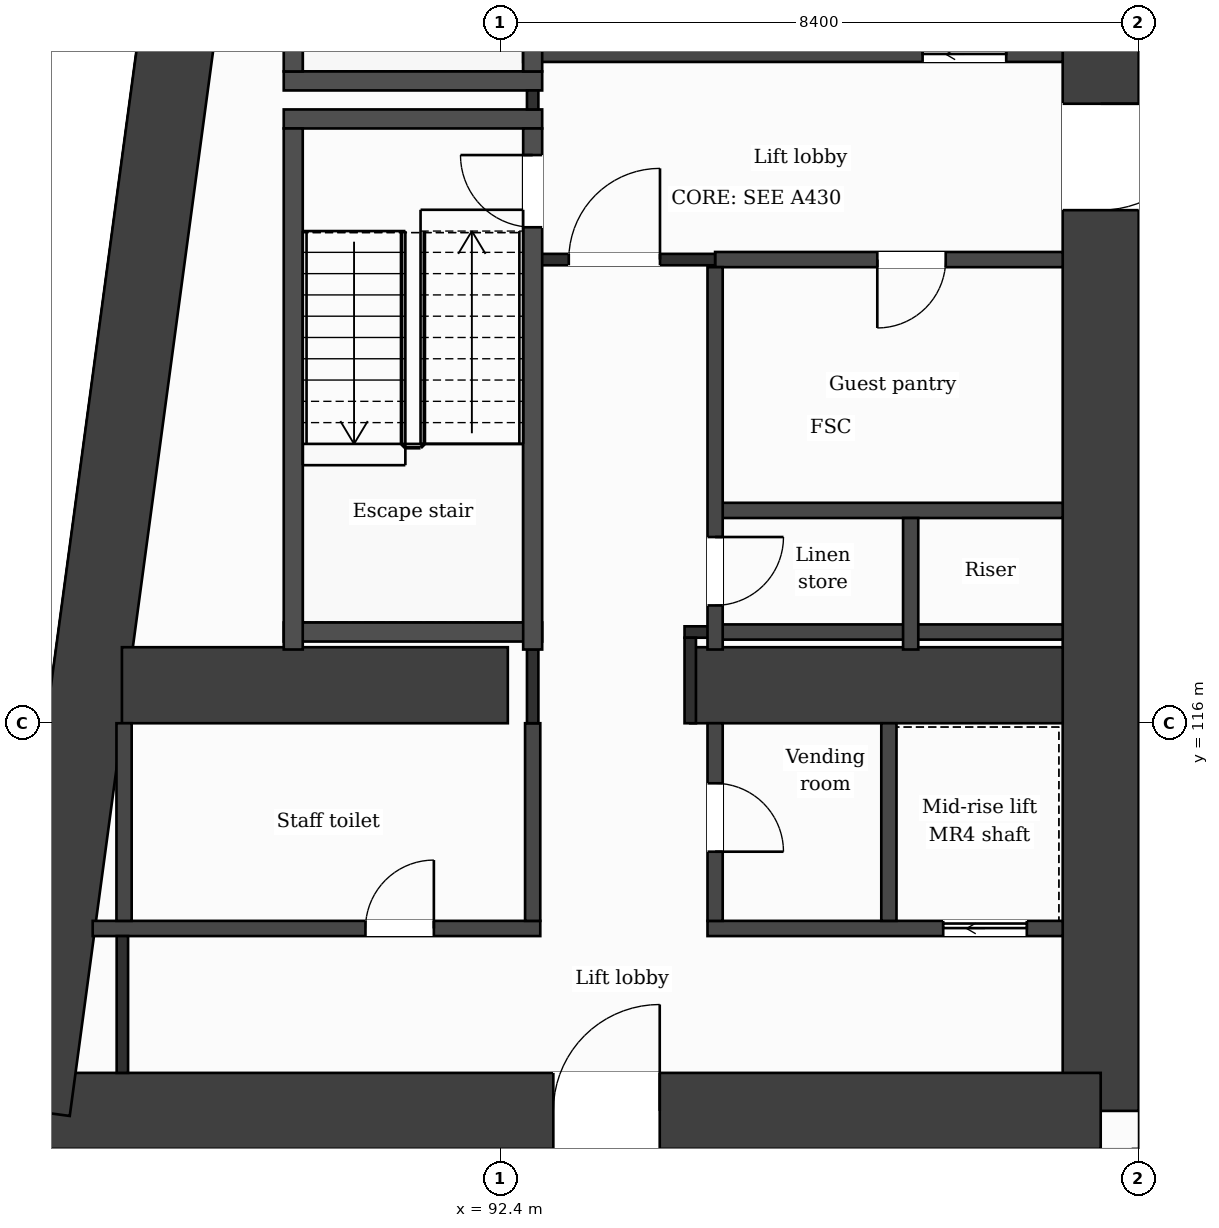
"""IFC4 building model, lengths in metres.
Left out: names, types, materials, properties, quantities, classifications, styles, units other than length and angle.
Written with IfcOpenShell. Run it as: python <this file> out.ifc"""

import sys

from ifc_helpers import new_model, si_unit, direction, frame, frame_2d, origin, place, context, subcontext, project, spatial, rectangle, extrude, element, fill, save


model = new_model("IFC4")
c1 = context("Model", 3, precision=1e-05, world=origin(), true_north=direction((0.0, 1.0)))
c2 = subcontext(c1, "Body", "Model", "MODEL_VIEW")
j1 = project(units=[si_unit("LENGTHUNIT", "METRE"), si_unit("PLANEANGLEUNIT", "RADIAN")], contexts=[c1])
p1 = place(None, origin())
s1 = spatial("IfcSite", under=j1, at=p1, CompositionType="ELEMENT")
p2 = place(p1, origin())
s2 = spatial("IfcBuilding", under=s1, at=p2, CompositionType="ELEMENT")
p3 = place(p2, frame((0.0, 0.0, 124.3)))
s3 = spatial("IfcBuildingStorey", under=s2, at=p3, CompositionType="ELEMENT", Elevation=124.3)
p4 = place(p3, frame((100.3, 131.9, 0.0), z_axis=(0.0, 0.0, 1.0), x_axis=(0.0, -1.0, 0.0)))
e1 = element("IfcWall", 1, at=p4, inside=s3, PredefinedType="SHEAR", context=c2, shape_type="SweptSolid", body=[
    extrude(rectangle(XDim=21.0, YDim=1.0, at=frame_2d((10.5, 0.0))), origin(), (0.0, 0.0, 1.0), 3.7),
])
p5 = place(p4, frame((7.75, 0.0, 0.0)))
e2 = element("IfcOpeningElement", 2, at=p5, cuts=e1, PredefinedType="OPENING", context=c2, shape_type="SweptSolid", body=[
    extrude(rectangle(XDim=1.4, YDim=2.1, at=frame_2d((0.7, 1.05))), frame((0.0, 0.51, 0.0), z_axis=(0.0, -1.0, 0.0), x_axis=(1.0, 0.0, 0.0)), (0.0, 0.0, 1.0), 1.02),
])
p6 = place(p3, frame((100.3, 110.9, 0.0), z_axis=(0.0, 0.0, 1.0), x_axis=(-1.0, 0.0, 0.0)))
e3 = element("IfcWall", 3, at=p6, inside=s3, PredefinedType="SHEAR", context=c2, shape_type="SweptSolid", body=[
    extrude(rectangle(XDim=14.059, YDim=1.0, at=frame_2d((7.03, 0.0))), origin(), (0.0, 0.0, 1.0), 3.7),
])
p7 = place(p6, frame((5.802, 0.0, 0.0)))
e4 = element("IfcOpeningElement", 4, at=p7, cuts=e3, PredefinedType="OPENING", context=c2, shape_type="SweptSolid", body=[
    extrude(rectangle(XDim=1.4, YDim=2.1, at=frame_2d((0.7, 1.05))), frame((0.0, 0.51, 0.0), z_axis=(0.0, -1.0, 0.0), x_axis=(1.0, 0.0, 0.0)), (0.0, 0.0, 1.0), 1.02),
])
p8 = place(p3, frame((86.241, 110.9, 0.0), z_axis=(0.0, 0.0, 1.0), x_axis=(0.133411141623, 0.991060778808, 0.0)))
e5 = element("IfcWall", 5, at=p8, inside=s3, PredefinedType="SHEAR", context=c2, shape_type="SweptSolid", body=[
    extrude(rectangle(XDim=21.189, YDim=1.0, at=frame_2d((10.595, 0.0))), origin(), (0.0, 0.0, 1.0), 3.7),
])
p9 = place(p3, frame((87.423, 116.5, 0.0), z_axis=(0.0, 0.0, 1.0), x_axis=(1.0, 0.0, 0.0)))
e6 = element("IfcWall", 6, at=p9, inside=s3, PredefinedType="SHEAR", context=c2, shape_type="SweptSolid", body=[
    extrude(rectangle(XDim=5.077, YDim=1.0, at=frame_2d((2.539, 0.0))), origin(), (0.0, 0.0, 1.0), 3.7),
])
p10 = place(p3, frame((94.9, 116.5, 0.0), z_axis=(0.0, 0.0, 1.0), x_axis=(1.0, 0.0, 0.0)))
e7 = element("IfcWall", 7, at=p10, inside=s3, PredefinedType="SHEAR", context=c2, shape_type="SweptSolid", body=[
    extrude(rectangle(XDim=4.9, YDim=1.0, at=frame_2d((2.45, 0.0))), origin(), (0.0, 0.0, 1.0), 3.7),
])
p11 = place(p3, frame((87.334, 110.4, 0.0), z_axis=(0.0, 0.0, 1.0), x_axis=(-0.133437175554, -0.991057273915, 0.0)))
e8 = element("IfcWall", 8, at=p11, inside=s3, PredefinedType="SOLIDWALL", context=c2, shape_type="SweptSolid", body=[
    extrude(rectangle(XDim=6.781, YDim=0.3, at=frame_2d((3.39, 0.0))), origin(), (0.0, 0.0, 1.0), 3.38),
])
p12 = place(p11, frame((1.418, 0.0, 0.0)))
e9 = element("IfcOpeningElement", 9, at=p12, cuts=e8, PredefinedType="OPENING", context=c2, shape_type="SweptSolid", body=[
    extrude(rectangle(XDim=1.2, YDim=2.4, at=frame_2d((0.6, 1.2))), frame((0.0, 0.16, 0.0), z_axis=(0.0, -1.0, 0.0), x_axis=(1.0, 0.0, 0.0)), (0.0, 0.0, 1.0), 0.32),
])
p13 = place(p11, frame((4.758, 0.0, 0.9)))
e10 = element("IfcOpeningElement", 10, at=p13, cuts=e8, PredefinedType="OPENING", context=c2, shape_type="SweptSolid", body=[
    extrude(rectangle(XDim=1.2, YDim=2.1, at=frame_2d((0.6, 1.05))), frame((0.0, 0.16, 0.0), z_axis=(0.0, -1.0, 0.0), x_axis=(1.0, 0.0, 0.0)), (0.0, 0.0, 1.0), 0.32),
])
p14 = place(p3, frame((87.039, 113.3, 0.0), z_axis=(0.0, 0.0, 1.0), x_axis=(1.0, 0.0, 0.0)))
e11 = element("IfcWall", 11, at=p14, inside=s3, PredefinedType="PARTITIONING", context=c2, shape_type="SweptSolid", body=[
    extrude(rectangle(XDim=5.888, YDim=0.2, at=frame_2d((2.944, 0.0))), origin(), (0.0, 0.0, 1.0), 3.38),
])
p15 = place(p14, frame((3.588, 0.0, 0.0)))
e12 = element("IfcOpeningElement", 12, at=p15, cuts=e11, PredefinedType="OPENING", context=c2, shape_type="SweptSolid", body=[
    extrude(rectangle(XDim=0.9, YDim=2.1, at=frame_2d((0.45, 1.05))), frame((0.0, 0.11, 0.0), z_axis=(0.0, -1.0, 0.0), x_axis=(1.0, 0.0, 0.0)), (0.0, 0.0, 1.0), 0.22),
])
p16 = place(p3, frame((95.127, 113.3, 0.0), z_axis=(0.0, 0.0, 1.0), x_axis=(1.0, 0.0, 0.0)))
e13 = element("IfcWall", 13, at=p16, inside=s3, PredefinedType="PARTITIONING", context=c2, shape_type="SweptSolid", body=[
    extrude(rectangle(XDim=4.673, YDim=0.2, at=frame_2d((2.336, 0.0))), origin(), (0.0, 0.0, 1.0), 3.38),
])
p17 = place(p16, frame((3.101, 0.0, 0.0)))
e14 = element("IfcOpeningElement", 14, at=p17, cuts=e13, PredefinedType="OPENING", context=c2, shape_type="SweptSolid", body=[
    extrude(rectangle(XDim=1.1, YDim=2.1, at=frame_2d((0.55, 1.05))), frame((0.0, 0.11, 0.0), z_axis=(0.0, -1.0, 0.0), x_axis=(1.0, 0.0, 0.0)), (0.0, 0.0, 1.0), 0.22),
])
p18 = place(p3, frame((95.227, 117.2, 0.0), z_axis=(0.0, 0.0, 1.0), x_axis=(1.0, 0.0, 0.0)))
e15 = element("IfcWall", 15, at=p18, inside=s3, PredefinedType="PARTITIONING", context=c2, shape_type="SweptSolid", body=[
    extrude(rectangle(XDim=4.573, YDim=0.2, at=frame_2d((2.287, 0.0))), origin(), (0.0, 0.0, 1.0), 3.38),
])
p19 = place(p3, frame((94.825, 117.2, 0.0), z_axis=(0.0, 0.0, 1.0), x_axis=(1.0, 0.0, 0.0)))
e16 = element("IfcWall", 16, at=p19, inside=s3, PredefinedType="PARTITIONING", context=c2, shape_type="SweptSolid", body=[
    extrude(rectangle(XDim=0.402, YDim=0.15, at=frame_2d((0.201, 0.0))), origin(), (0.0, 0.0, 1.0), 3.38),
])
p20 = place(p3, frame((89.552, 117.2, 0.0), z_axis=(0.0, 0.0, 1.0), x_axis=(1.0, 0.0, 0.0)))
e17 = element("IfcWall", 17, at=p20, inside=s3, PredefinedType="PARTITIONING", context=c2, shape_type="SweptSolid", body=[
    extrude(rectangle(XDim=3.4, YDim=0.25, at=frame_2d((1.7, 0.0))), origin(), (0.0, 0.0, 1.0), 3.38),
])
p21 = place(p3, frame((95.227, 118.8, 0.0), z_axis=(0.0, 0.0, 1.0), x_axis=(1.0, 0.0, 0.0)))
e18 = element("IfcWall", 18, at=p21, inside=s3, PredefinedType="PARTITIONING", context=c2, shape_type="SweptSolid", body=[
    extrude(rectangle(XDim=4.573, YDim=0.2, at=frame_2d((2.287, 0.0))), origin(), (0.0, 0.0, 1.0), 3.38),
])
p22 = place(p3, frame((95.227, 122.1, 0.0), z_axis=(0.0, 0.0, 1.0), x_axis=(1.0, 0.0, 0.0)))
e19 = element("IfcWall", 19, at=p22, inside=s3, PredefinedType="PARTITIONING", context=c2, shape_type="SweptSolid", body=[
    extrude(rectangle(XDim=4.573, YDim=0.2, at=frame_2d((2.287, 0.0))), origin(), (0.0, 0.0, 1.0), 3.38),
])
p23 = place(p22, frame((2.134, 0.0, 0.0)))
e20 = element("IfcOpeningElement", 20, at=p23, cuts=e19, PredefinedType="OPENING", context=c2, shape_type="SweptSolid", body=[
    extrude(rectangle(XDim=0.9, YDim=2.1, at=frame_2d((0.45, 1.05))), frame((0.0, 0.11, 0.0), z_axis=(0.0, -1.0, 0.0), x_axis=(1.0, 0.0, 0.0)), (0.0, 0.0, 1.0), 0.22),
])
p24 = place(p3, frame((92.827, 122.1, 0.0), z_axis=(0.0, 0.0, 1.0), x_axis=(1.0, 0.0, 0.0)))
e21 = element("IfcWall", 21, at=p24, inside=s3, PredefinedType="PARTITIONING", context=c2, shape_type="SweptSolid", body=[
    extrude(rectangle(XDim=2.4, YDim=0.15, at=frame_2d((1.2, 0.0))), origin(), (0.0, 0.0, 1.0), 3.38),
])
p25 = place(p24, frame((0.475, 0.0, 0.0)))
e22 = element("IfcOpeningElement", 22, at=p25, cuts=e21, PredefinedType="OPENING", context=c2, shape_type="SweptSolid", body=[
    extrude(rectangle(XDim=1.2, YDim=2.1, at=frame_2d((0.6, 1.05))), frame((0.0, 0.085, 0.0), z_axis=(0.0, -1.0, 0.0), x_axis=(1.0, 0.0, 0.0)), (0.0, 0.0, 1.0), 0.17),
])
for number, where, z_axis, x_axis in (
    (23, (89.552, 123.95, 0.0), (0.0, 0.0, 1.0), (1.0, 0.0, 0.0)),
    (24, (89.552, 124.45, 0.0), (0.0, 0.0, 1.0), (1.0, 0.0, 0.0)),
):
    element("IfcWall", number, at=place(p3, frame(where, z_axis=z_axis, x_axis=x_axis)), inside=s3, PredefinedType="PARTITIONING", context=c2, shape_type="SweptSolid", body=[
        extrude(rectangle(XDim=3.4, YDim=0.25, at=frame_2d((1.7, 0.0))), origin(), (0.0, 0.0, 1.0), 3.38),
    ])
p26 = place(p3, frame((92.702, 124.8, 0.0), z_axis=(0.0, 0.0, 1.0), x_axis=(1.0, 0.0, 0.0)))
e25 = element("IfcWall", 25, at=p26, inside=s3, PredefinedType="PARTITIONING", context=c2, shape_type="SweptSolid", body=[
    extrude(rectangle(XDim=7.098, YDim=0.2, at=frame_2d((3.549, 0.0))), origin(), (0.0, 0.0, 1.0), 3.38),
])
p27 = place(p26, frame((5.255, 0.0, 0.0)))
e26 = element("IfcOpeningElement", 26, at=p27, cuts=e25, PredefinedType="OPENING", context=c2, shape_type="SweptSolid", body=[
    extrude(rectangle(XDim=1.1, YDim=2.1, at=frame_2d((0.55, 1.05))), frame((0.0, 0.11, 0.0), z_axis=(0.0, -1.0, 0.0), x_axis=(1.0, 0.0, 0.0)), (0.0, 0.0, 1.0), 0.22),
])
p28 = place(p3, frame((87.451, 113.4, 0.0), z_axis=(0.0, 0.0, 1.0), x_axis=(0.0, 1.0, 0.0)))
e27 = element("IfcWall", 27, at=p28, inside=s3, PredefinedType="PARTITIONING", context=c2, shape_type="SweptSolid", body=[
    extrude(rectangle(XDim=2.6, YDim=0.2, at=frame_2d((1.3, 0.0))), origin(), (0.0, 0.0, 1.0), 3.38),
])
p29 = place(p3, frame((87.429, 111.4, 0.0), z_axis=(0.0, 0.0, 1.0), x_axis=(0.0, 1.0, 0.0)))
e28 = element("IfcWall", 28, at=p29, inside=s3, PredefinedType="PARTITIONING", context=c2, shape_type="SweptSolid", body=[
    extrude(rectangle(XDim=1.8, YDim=0.15, at=frame_2d((0.9, 0.0))), origin(), (0.0, 0.0, 1.0), 3.38),
])
for number, where, z_axis, x_axis in (
    (29, (89.677, 116.97, 0.0), (0.0, 0.0, 1.0), (0.0, 1.0, 0.0)),
    (30, (89.677, 124.575, 0.0), (0.0, 0.0, 1.0), (0.0, 1.0, 0.0)),
):
    element("IfcWall", number, at=place(p3, frame(where, z_axis=z_axis, x_axis=x_axis)), inside=s3, PredefinedType="PARTITIONING", context=c2, shape_type="SweptSolid", body=[
        extrude(rectangle(XDim=6.855, YDim=0.25, at=frame_2d((3.427, 0.0))), origin(), (0.0, 0.0, 1.0), 3.38),
    ])
p30 = place(p3, frame((92.827, 113.4, 0.0), z_axis=(0.0, 0.0, 1.0), x_axis=(0.0, 1.0, 0.0)))
e31 = element("IfcWall", 31, at=p30, inside=s3, PredefinedType="PARTITIONING", context=c2, shape_type="SweptSolid", body=[
    extrude(rectangle(XDim=2.6, YDim=0.2, at=frame_2d((1.3, 0.0))), origin(), (0.0, 0.0, 1.0), 3.38),
])
p31 = place(p3, frame((92.827, 116.0, 0.0), z_axis=(0.0, 0.0, 1.0), x_axis=(0.0, 1.0, 0.0)))
e32 = element("IfcWall", 32, at=p31, inside=s3, PredefinedType="PARTITIONING", context=c2, shape_type="SweptSolid", body=[
    extrude(rectangle(XDim=0.97, YDim=0.15, at=frame_2d((0.485, 0.0))), origin(), (0.0, 0.0, 1.0), 3.38),
])
p32 = place(p3, frame((92.827, 124.075, 0.0), z_axis=(0.0, 0.0, 1.0), x_axis=(0.0, 1.0, 0.0)))
e33 = element("IfcWall", 33, at=p32, inside=s3, PredefinedType="PARTITIONING", context=c2, shape_type="SweptSolid", body=[
    extrude(rectangle(XDim=0.25, YDim=0.15, at=frame_2d((0.125, 0.0))), origin(), (0.0, 0.0, 1.0), 3.38),
])
p33 = place(p3, frame((92.827, 116.97, 0.0), z_axis=(0.0, 0.0, 1.0), x_axis=(0.0, 1.0, 0.0)))
e34 = element("IfcWall", 34, at=p33, inside=s3, PredefinedType="PARTITIONING", context=c2, shape_type="SweptSolid", body=[
    extrude(rectangle(XDim=6.855, YDim=0.25, at=frame_2d((3.427, 0.0))), origin(), (0.0, 0.0, 1.0), 3.38),
])
p34 = place(p33, frame((5.555, 0.0, 0.0)))
e35 = element("IfcOpeningElement", 35, at=p34, cuts=e34, PredefinedType="OPENING", context=c2, shape_type="SweptSolid", body=[
    extrude(rectangle(XDim=0.95, YDim=2.1, at=frame_2d((0.475, 1.05))), frame((0.0, 0.135, 0.0), z_axis=(0.0, -1.0, 0.0), x_axis=(1.0, 0.0, 0.0)), (0.0, 0.0, 1.0), 0.27),
])
p35 = place(p3, frame((92.827, 124.575, 0.0), z_axis=(0.0, 0.0, 1.0), x_axis=(0.0, 1.0, 0.0)))
e36 = element("IfcWall", 36, at=p35, inside=s3, PredefinedType="PARTITIONING", context=c2, shape_type="SweptSolid", body=[
    extrude(rectangle(XDim=6.855, YDim=0.25, at=frame_2d((3.427, 0.0))), origin(), (0.0, 0.0, 1.0), 3.38),
])
p36 = place(p35, frame((5.325, 0.0, 0.0)))
e37 = element("IfcOpeningElement", 37, at=p36, cuts=e36, PredefinedType="OPENING", context=c2, shape_type="SweptSolid", body=[
    extrude(rectangle(XDim=1.0, YDim=2.1, at=frame_2d((0.5, 1.05))), frame((0.0, 0.135, 0.0), z_axis=(0.0, -1.0, 0.0), x_axis=(1.0, 0.0, 0.0)), (0.0, 0.0, 1.0), 0.27),
])
p37 = place(p3, frame((94.9, 116.0, 0.0), z_axis=(0.0, 0.0, 1.0), x_axis=(0.0, 1.0, 0.0)))
e38 = element("IfcWall", 38, at=p37, inside=s3, PredefinedType="PARTITIONING", context=c2, shape_type="SweptSolid", body=[
    extrude(rectangle(XDim=1.125, YDim=0.15, at=frame_2d((0.562, 0.0))), origin(), (0.0, 0.0, 1.0), 3.38),
])
p38 = place(p3, frame((95.227, 113.4, 0.0), z_axis=(0.0, 0.0, 1.0), x_axis=(0.0, 1.0, 0.0)))
e39 = element("IfcWall", 39, at=p38, inside=s3, PredefinedType="PARTITIONING", context=c2, shape_type="SweptSolid", body=[
    extrude(rectangle(XDim=2.6, YDim=0.2, at=frame_2d((1.3, 0.0))), origin(), (0.0, 0.0, 1.0), 3.38),
])
p39 = place(p38, frame((0.91, 0.0, 0.0)))
e40 = element("IfcOpeningElement", 40, at=p39, cuts=e39, PredefinedType="OPENING", context=c2, shape_type="SweptSolid", body=[
    extrude(rectangle(XDim=0.9, YDim=2.1, at=frame_2d((0.45, 1.05))), frame((0.0, 0.11, 0.0), z_axis=(0.0, -1.0, 0.0), x_axis=(1.0, 0.0, 0.0)), (0.0, 0.0, 1.0), 0.22),
])
p40 = place(p3, frame((95.227, 116.97, 0.0), z_axis=(0.0, 0.0, 1.0), x_axis=(0.0, 1.0, 0.0)))
e41 = element("IfcWall", 41, at=p40, inside=s3, PredefinedType="PARTITIONING", context=c2, shape_type="SweptSolid", body=[
    extrude(rectangle(XDim=5.03, YDim=0.2, at=frame_2d((2.515, 0.0))), origin(), (0.0, 0.0, 1.0), 3.38),
])
p41 = place(p40, frame((0.58, 0.0, 0.0)))
e42 = element("IfcOpeningElement", 42, at=p41, cuts=e41, PredefinedType="OPENING", context=c2, shape_type="SweptSolid", body=[
    extrude(rectangle(XDim=0.9, YDim=2.1, at=frame_2d((0.45, 1.05))), frame((0.0, 0.11, 0.0), z_axis=(0.0, -1.0, 0.0), x_axis=(1.0, 0.0, 0.0)), (0.0, 0.0, 1.0), 0.22),
])
p42 = place(p3, frame((97.513, 113.4, 0.0), z_axis=(0.0, 0.0, 1.0), x_axis=(0.0, 1.0, 0.0)))
e43 = element("IfcWall", 43, at=p42, inside=s3, PredefinedType="PARTITIONING", context=c2, shape_type="SweptSolid", body=[
    extrude(rectangle(XDim=2.6, YDim=0.2, at=frame_2d((1.3, 0.0))), origin(), (0.0, 0.0, 1.0), 3.38),
])
p43 = place(p3, frame((97.8, 116.97, 0.0), z_axis=(0.0, 0.0, 1.0), x_axis=(0.0, 1.0, 0.0)))
e44 = element("IfcWall", 44, at=p43, inside=s3, PredefinedType="PARTITIONING", context=c2, shape_type="SweptSolid", body=[
    extrude(rectangle(XDim=1.73, YDim=0.2, at=frame_2d((0.865, 0.0))), origin(), (0.0, 0.0, 1.0), 3.38),
])
p44 = place(p3, frame((100.8, 109.075, 0.0), z_axis=(0.0, 0.0, 1.0), x_axis=(0.0, 1.0, 0.0)))
e45 = element("IfcWall", 45, at=p44, inside=s3, PredefinedType="PARTITIONING", context=c2, shape_type="SweptSolid", body=[
    extrude(rectangle(XDim=1.325, YDim=0.15, at=frame_2d((0.663, 0.0))), origin(), (0.0, 0.0, 1.0), 3.38),
])
p45 = place(p25, origin())
e46 = element("IfcDoor", 46, at=p45, inside=s3, OperationType="SINGLE_SWING_RIGHT", PredefinedType="DOOR", context=c2, shape_type="SweptSolid", body=[
    extrude(rectangle(XDim=1.2, YDim=2.1, at=frame_2d((0.6, 1.05))), frame((0.0, 0.025, 0.0), z_axis=(0.0, -1.0, 0.0), x_axis=(1.0, 0.0, 0.0)), (0.0, 0.0, 1.0), 0.05),
])
fill(e22, e46)
p46 = place(p27, origin())
e47 = element("IfcDoor", 47, at=p46, inside=s3, OperationType="SLIDING_TO_LEFT", PredefinedType="DOOR", context=c2, shape_type="SweptSolid", body=[
    extrude(rectangle(XDim=1.1, YDim=2.1, at=frame_2d((0.55, 1.05))), frame((0.0, 0.025, 0.0), z_axis=(0.0, -1.0, 0.0), x_axis=(1.0, 0.0, 0.0)), (0.0, 0.0, 1.0), 0.05),
])
fill(e26, e47)
p47 = place(p23, origin())
e48 = element("IfcDoor", 48, at=p47, inside=s3, OperationType="SINGLE_SWING_LEFT", PredefinedType="DOOR", context=c2, shape_type="SweptSolid", body=[
    extrude(rectangle(XDim=0.9, YDim=2.1, at=frame_2d((0.45, 1.05))), frame((0.0, 0.025, 0.0), z_axis=(0.0, -1.0, 0.0), x_axis=(1.0, 0.0, 0.0)), (0.0, 0.0, 1.0), 0.05),
])
fill(e20, e48)
p48 = place(p34, origin())
e49 = element("IfcDoor", 49, at=p48, inside=s3, OperationType="SINGLE_SWING_RIGHT", PredefinedType="DOOR", context=c2, shape_type="SweptSolid", body=[
    extrude(rectangle(XDim=0.95, YDim=2.1, at=frame_2d((0.475, 1.05))), frame((0.0, 0.025, 0.0), z_axis=(0.0, -1.0, 0.0), x_axis=(1.0, 0.0, 0.0)), (0.0, 0.0, 1.0), 0.05),
])
fill(e35, e49)
p49 = place(p41, origin())
e50 = element("IfcDoor", 50, at=p49, inside=s3, OperationType="SINGLE_SWING_RIGHT", PredefinedType="DOOR", context=c2, shape_type="SweptSolid", body=[
    extrude(rectangle(XDim=0.9, YDim=2.1, at=frame_2d((0.45, 1.05))), frame((0.0, 0.025, 0.0), z_axis=(0.0, -1.0, 0.0), x_axis=(1.0, 0.0, 0.0)), (0.0, 0.0, 1.0), 0.05),
])
fill(e42, e50)
p50 = place(p17, origin())
e51 = element("IfcDoor", 51, at=p50, inside=s3, OperationType="SLIDING_TO_LEFT", PredefinedType="DOOR", context=c2, shape_type="SweptSolid", body=[
    extrude(rectangle(XDim=1.1, YDim=2.1, at=frame_2d((0.55, 1.05))), frame((0.0, 0.025, 0.0), z_axis=(0.0, -1.0, 0.0), x_axis=(1.0, 0.0, 0.0)), (0.0, 0.0, 1.0), 0.05),
])
fill(e14, e51)
p51 = place(p15, origin())
e52 = element("IfcDoor", 52, at=p51, inside=s3, OperationType="SINGLE_SWING_RIGHT", PredefinedType="DOOR", context=c2, shape_type="SweptSolid", body=[
    extrude(rectangle(XDim=0.9, YDim=2.1, at=frame_2d((0.45, 1.05))), frame((0.0, 0.025, 0.0), z_axis=(0.0, -1.0, 0.0), x_axis=(1.0, 0.0, 0.0)), (0.0, 0.0, 1.0), 0.05),
])
fill(e12, e52)
p52 = place(p39, origin())
e53 = element("IfcDoor", 53, at=p52, inside=s3, OperationType="SINGLE_SWING_LEFT", PredefinedType="DOOR", context=c2, shape_type="SweptSolid", body=[
    extrude(rectangle(XDim=0.9, YDim=2.1, at=frame_2d((0.45, 1.05))), frame((0.0, 0.025, 0.0), z_axis=(0.0, -1.0, 0.0), x_axis=(1.0, 0.0, 0.0)), (0.0, 0.0, 1.0), 0.05),
])
fill(e40, e53)
p53 = place(p7, origin())
e54 = element("IfcDoor", 54, at=p53, inside=s3, OperationType="SINGLE_SWING_LEFT", PredefinedType="DOOR", context=c2, shape_type="SweptSolid", body=[
    extrude(rectangle(XDim=1.4, YDim=2.1, at=frame_2d((0.7, 1.05))), frame((0.0, 0.025, 0.0), z_axis=(0.0, -1.0, 0.0), x_axis=(1.0, 0.0, 0.0)), (0.0, 0.0, 1.0), 0.05),
])
fill(e4, e54)
p54 = place(p5, origin())
e55 = element("IfcDoor", 55, at=p54, inside=s3, OperationType="SINGLE_SWING_LEFT", PredefinedType="DOOR", context=c2, shape_type="SweptSolid", body=[
    extrude(rectangle(XDim=1.4, YDim=2.1, at=frame_2d((0.7, 1.05))), frame((0.0, 0.025, 0.0), z_axis=(0.0, -1.0, 0.0), x_axis=(1.0, 0.0, 0.0)), (0.0, 0.0, 1.0), 0.05),
])
fill(e2, e55)
save(model, sys.argv[1])
